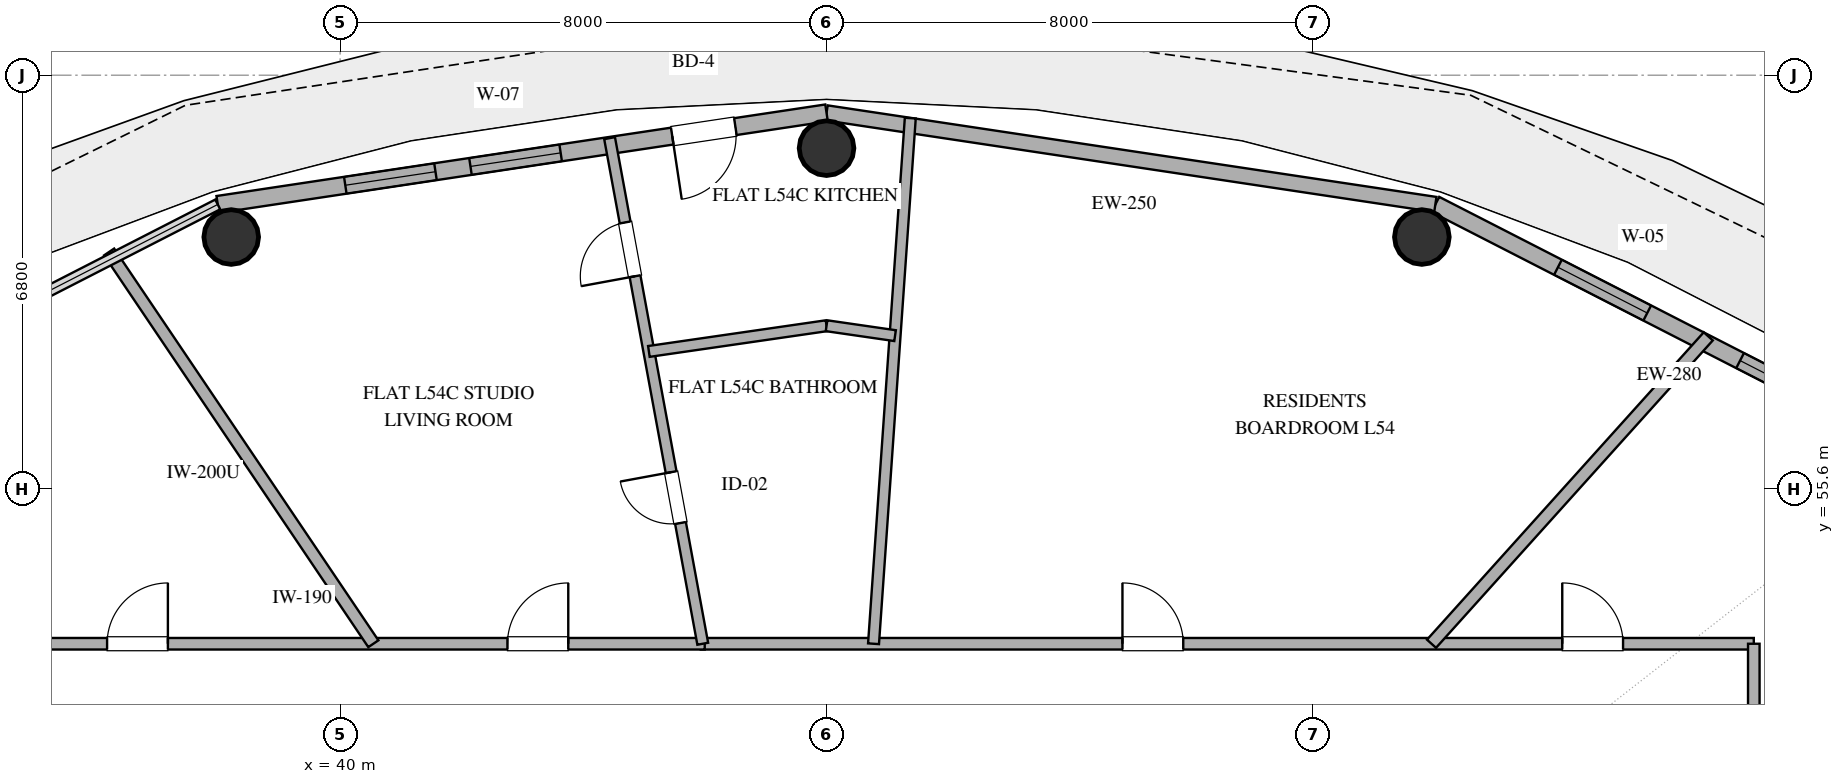
"""IFC4 building model, lengths in metres.
Left out: names, types, materials, properties, quantities, classifications, styles, units other than length and angle.
Written with IfcOpenShell. Run it as: python <this file> out.ifc"""

import sys

from ifc_helpers import new_model, si_unit, direction, frame, frame_2d, origin, origin_2d, place, context, subcontext, project, spatial, rectangle, hollow_circle, extrude, element, fill, save


model = new_model("IFC4")
c1 = context("Model", 3, precision=1e-05, world=origin(), true_north=direction((0.0, 1.0)))
c2 = subcontext(c1, "Body", "Model", "MODEL_VIEW")
j1 = project(units=[si_unit("LENGTHUNIT", "METRE"), si_unit("PLANEANGLEUNIT", "RADIAN")], contexts=[c1])
p1 = place(None, origin())
s1 = spatial("IfcSite", under=j1, at=p1, CompositionType="ELEMENT")
p2 = place(p1, origin())
s2 = spatial("IfcBuilding", under=s1, at=p2, CompositionType="ELEMENT")
p3 = place(p2, frame((0.0, 0.0, 213.6)))
s3 = spatial("IfcBuildingStorey", under=s2, at=p3, CompositionType="ELEMENT", Elevation=213.6)
for number, where, z_axis, x_axis in (
    (1, (57.791, 59.739, 0.0), (0.0, 0.0, 1.0), (1.0, 0.0, 0.0)),
    (2, (48.0, 61.2, 0.0), (0.0, 0.0, 1.0), (1.0, 0.0, 0.0)),
    (3, (38.209, 59.739, 0.0), (0.0, 0.0, 1.0), (1.0, 0.0, 0.0)),
):
    element("IfcColumn", number, at=place(p3, frame(where, z_axis=z_axis, x_axis=x_axis)), inside=s3, PredefinedType="COLUMN", context=c2, shape_type="SweptSolid", body=[
        extrude(hollow_circle(Radius=0.45, WallThickness=0.025, at=origin_2d()), origin(), (0.0, 0.0, 1.0), 3.36),
    ])
p4 = place(p3, frame((66.383, 55.987, 0.0), z_axis=(0.0, 0.0, 1.0), x_axis=(-0.890007394051, 0.455946091699, 0.0)))
e4 = element("IfcWall", 4, at=p4, inside=s3, PredefinedType="SOLIDWALL", context=c2, shape_type="SweptSolid", body=[
    extrude(rectangle(XDim=9.404, YDim=0.28, at=frame_2d((4.702, 0.0))), origin(), (0.0, 0.0, 1.0), 3.36),
])
p5 = place(p4, frame((1.973, 0.0, 0.85)))
e5 = element("IfcOpeningElement", 5, at=p5, cuts=e4, PredefinedType="OPENING", context=c2, shape_type="SweptSolid", body=[
    extrude(rectangle(XDim=1.8, YDim=2.2, at=frame_2d((0.9, 1.1))), frame((0.0, 0.15, 0.0), z_axis=(0.0, -1.0, 0.0), x_axis=(1.0, 0.0, 0.0)), (0.0, 0.0, 1.0), 0.3),
])
p6 = place(p4, frame((5.489, 0.0, 0.85)))
e6 = element("IfcOpeningElement", 6, at=p6, cuts=e4, PredefinedType="OPENING", context=c2, shape_type="SweptSolid", body=[
    extrude(rectangle(XDim=1.65, YDim=2.0, at=frame_2d((0.825, 1.0))), frame((0.0, 0.15, 0.0), z_axis=(0.0, -1.0, 0.0), x_axis=(1.0, 0.0, 0.0)), (0.0, 0.0, 1.0), 0.3),
])
p7 = place(p3, frame((58.013, 60.274, 0.0), z_axis=(0.0, 0.0, 1.0), x_axis=(-0.988882522213, 0.148698881169, 0.0)))
e7 = element("IfcWall", 7, at=p7, inside=s3, PredefinedType="SOLIDWALL", context=c2, shape_type="SweptSolid", body=[
    extrude(rectangle(XDim=10.125, YDim=0.25, at=frame_2d((5.062, 0.0))), origin(), (0.0, 0.0, 1.0), 3.36),
])
p8 = place(p3, frame((48.0, 61.78, 0.0), z_axis=(0.0, 0.0, 1.0), x_axis=(-0.988882522213, -0.148698881169, 0.0)))
e8 = element("IfcWall", 8, at=p8, inside=s3, PredefinedType="SOLIDWALL", context=c2, shape_type="SweptSolid", body=[
    extrude(rectangle(XDim=10.125, YDim=0.28, at=frame_2d((5.062, 0.0))), origin(), (0.0, 0.0, 1.0), 3.36),
])
p9 = place(p8, frame((1.516, 0.0, 0.0)))
e9 = element("IfcOpeningElement", 9, at=p9, cuts=e8, PredefinedType="OPENING", context=c2, shape_type="SweptSolid", body=[
    extrude(rectangle(XDim=1.05, YDim=2.2, at=frame_2d((0.525, 1.1))), frame((0.0, 0.15, 0.0), z_axis=(0.0, -1.0, 0.0), x_axis=(1.0, 0.0, 0.0)), (0.0, 0.0, 1.0), 0.3),
])
p10 = place(p8, frame((4.422, 0.0, 0.85)))
e10 = element("IfcOpeningElement", 10, at=p10, cuts=e8, PredefinedType="OPENING", context=c2, shape_type="SweptSolid", body=[
    extrude(rectangle(XDim=1.5, YDim=1.8, at=frame_2d((0.75, 0.9))), frame((0.0, 0.15, 0.0), z_axis=(0.0, -1.0, 0.0), x_axis=(1.0, 0.0, 0.0)), (0.0, 0.0, 1.0), 0.3),
])
p11 = place(p8, frame((6.504, 0.0, 0.85)))
e11 = element("IfcOpeningElement", 11, at=p11, cuts=e8, PredefinedType="OPENING", context=c2, shape_type="SweptSolid", body=[
    extrude(rectangle(XDim=1.5, YDim=1.8, at=frame_2d((0.75, 0.9))), frame((0.0, 0.15, 0.0), z_axis=(0.0, -1.0, 0.0), x_axis=(1.0, 0.0, 0.0)), (0.0, 0.0, 1.0), 0.3),
])
p12 = place(p3, frame((45.931, 53.05, 0.0), z_axis=(0.0, 0.0, 1.0), x_axis=(1.0, 0.0, 0.0)))
e12 = element("IfcWall", 12, at=p12, inside=s3, PredefinedType="PARTITIONING", context=c2, shape_type="SweptSolid", body=[
    extrude(rectangle(XDim=17.319, YDim=0.19, at=frame_2d((8.659, 0.0))), origin(), (0.0, 0.0, 1.0), 2.72),
])
p13 = place(p12, frame((6.935, 0.0, 0.0)))
e13 = element("IfcOpeningElement", 13, at=p13, cuts=e12, PredefinedType="OPENING", context=c2, shape_type="SweptSolid", body=[
    extrude(rectangle(XDim=1.0, YDim=2.2, at=frame_2d((0.5, 1.1))), frame((0.0, 0.105, 0.0), z_axis=(0.0, -1.0, 0.0), x_axis=(1.0, 0.0, 0.0)), (0.0, 0.0, 1.0), 0.21),
])
p14 = place(p12, frame((14.168, 0.0, 0.0)))
e14 = element("IfcOpeningElement", 14, at=p14, cuts=e12, PredefinedType="OPENING", context=c2, shape_type="SweptSolid", body=[
    extrude(rectangle(XDim=1.0, YDim=2.2, at=frame_2d((0.5, 1.1))), frame((0.0, 0.105, 0.0), z_axis=(0.0, -1.0, 0.0), x_axis=(1.0, 0.0, 0.0)), (0.0, 0.0, 1.0), 0.21),
])
p15 = place(p3, frame((32.75, 53.05, 0.0), z_axis=(0.0, 0.0, 1.0), x_axis=(1.0, 0.0, 0.0)))
e15 = element("IfcWall", 15, at=p15, inside=s3, PredefinedType="PARTITIONING", context=c2, shape_type="SweptSolid", body=[
    extrude(rectangle(XDim=13.247, YDim=0.19, at=frame_2d((6.623, 0.0))), origin(), (0.0, 0.0, 1.0), 2.72),
])
p16 = place(p15, frame((3.417, 0.0, 0.0)))
e16 = element("IfcOpeningElement", 16, at=p16, cuts=e15, PredefinedType="OPENING", context=c2, shape_type="SweptSolid", body=[
    extrude(rectangle(XDim=1.0, YDim=2.2, at=frame_2d((0.5, 1.1))), frame((0.0, 0.105, 0.0), z_axis=(0.0, -1.0, 0.0), x_axis=(1.0, 0.0, 0.0)), (0.0, 0.0, 1.0), 0.21),
])
p17 = place(p15, frame((10.002, 0.0, 0.0)))
e17 = element("IfcOpeningElement", 17, at=p17, cuts=e15, PredefinedType="OPENING", context=c2, shape_type="SweptSolid", body=[
    extrude(rectangle(XDim=1.0, YDim=2.2, at=frame_2d((0.5, 1.1))), frame((0.0, 0.105, 0.0), z_axis=(0.0, -1.0, 0.0), x_axis=(1.0, 0.0, 0.0)), (0.0, 0.0, 1.0), 0.21),
])
p18 = place(p3, frame((40.547, 53.05, 0.0), z_axis=(0.0, 0.0, 1.0), x_axis=(-0.559208454265, 0.8290270832, 0.0)))
e18 = element("IfcWall", 18, at=p18, inside=s3, PredefinedType="PARTITIONING", context=c2, shape_type="SweptSolid", body=[
    extrude(rectangle(XDim=7.771, YDim=0.2, at=frame_2d((3.886, 0.0))), origin(), (0.0, 0.0, 1.0), 2.72),
])
p19 = place(p3, frame((57.949, 53.05, 0.0), z_axis=(0.0, 0.0, 1.0), x_axis=(0.66913524162, 0.743140651844, 0.0)))
e19 = element("IfcWall", 19, at=p19, inside=s3, PredefinedType="PARTITIONING", context=c2, shape_type="SweptSolid", body=[
    extrude(rectangle(XDim=6.802, YDim=0.2, at=frame_2d((3.401, 0.0))), origin(), (0.0, 0.0, 1.0), 2.72),
])
p20 = place(p3, frame((48.773, 53.05, 0.0), z_axis=(0.0, 0.0, 1.0), x_axis=(0.069763237321, 0.997563577281, 0.0)))
e20 = element("IfcWall", 20, at=p20, inside=s3, PredefinedType="PLUMBINGWALL", context=c2, shape_type="SweptSolid", body=[
    extrude(rectangle(XDim=8.665, YDim=0.18, at=frame_2d((4.333, 0.0))), origin(), (0.0, 0.0, 1.0), 2.72),
])
p21 = place(p3, frame((45.964, 53.05, 0.0), z_axis=(0.0, 0.0, 1.0), x_axis=(-0.181227840828, 0.983441136881, 0.0)))
e21 = element("IfcWall", 21, at=p21, inside=s3, PredefinedType="PLUMBINGWALL", context=c2, shape_type="SweptSolid", body=[
    extrude(rectangle(XDim=8.455, YDim=0.18, at=frame_2d((4.227, 0.0))), origin(), (0.0, 0.0, 1.0), 2.72),
])
p22 = place(p21, frame((2.019, 0.0, 0.0)))
e22 = element("IfcOpeningElement", 22, at=p22, cuts=e21, PredefinedType="OPENING", context=c2, shape_type="SweptSolid", body=[
    extrude(rectangle(XDim=0.85, YDim=2.1, at=frame_2d((0.425, 1.05))), frame((0.0, 0.1, 0.0), z_axis=(0.0, -1.0, 0.0), x_axis=(1.0, 0.0, 0.0)), (0.0, 0.0, 1.0), 0.2),
])
p23 = place(p21, frame((6.145, 0.0, 0.0)))
e23 = element("IfcOpeningElement", 23, at=p23, cuts=e21, PredefinedType="OPENING", context=c2, shape_type="SweptSolid", body=[
    extrude(rectangle(XDim=0.9, YDim=2.1, at=frame_2d((0.45, 1.05))), frame((0.0, 0.1, 0.0), z_axis=(0.0, -1.0, 0.0), x_axis=(1.0, 0.0, 0.0)), (0.0, 0.0, 1.0), 0.2),
])
p24 = place(p3, frame((63.25, 45.35, 0.0), z_axis=(0.0, 0.0, 1.0), x_axis=(0.0, 1.0, 0.0)))
e24 = element("IfcWall", 24, at=p24, inside=s3, PredefinedType="PARTITIONING", context=c2, shape_type="SweptSolid", body=[
    extrude(rectangle(XDim=7.7, YDim=0.19, at=frame_2d((3.85, 0.0))), origin(), (0.0, 0.0, 1.0), 2.72),
])
p25 = place(p3, frame((45.078, 57.857, 0.0), z_axis=(0.0, 0.0, 1.0), x_axis=(0.989678113628, 0.143308169361, 0.0)))
e25 = element("IfcWall", 25, at=p25, inside=s3, PredefinedType="PLUMBINGWALL", context=c2, shape_type="SweptSolid", body=[
    extrude(rectangle(XDim=2.952, YDim=0.18, at=frame_2d((1.476, 0.0))), origin(), (0.0, 0.0, 1.0), 2.72),
])
p26 = place(p3, frame((48.0, 58.28, 0.0), z_axis=(0.0, 0.0, 1.0), x_axis=(0.989660157939, -0.143432115611, 0.0)))
e26 = element("IfcWall", 26, at=p26, inside=s3, PredefinedType="PLUMBINGWALL", context=c2, shape_type="SweptSolid", body=[
    extrude(rectangle(XDim=1.139, YDim=0.18, at=frame_2d((0.569, 0.0))), origin(), (0.0, 0.0, 1.0), 2.72),
])
p27 = place(p5, origin())
e27 = element("IfcWindow", 27, at=p27, inside=s3, PartitioningType="SINGLE_PANEL", PredefinedType="WINDOW", context=c2, shape_type="SweptSolid", body=[
    extrude(rectangle(XDim=1.8, YDim=2.2, at=frame_2d((0.9, 1.1))), frame((0.0, 0.03, 0.0), z_axis=(0.0, -1.0, 0.0), x_axis=(1.0, 0.0, 0.0)), (0.0, 0.0, 1.0), 0.06),
])
fill(e5, e27)
p28 = place(p6, origin())
e28 = element("IfcWindow", 28, at=p28, inside=s3, PartitioningType="SINGLE_PANEL", PredefinedType="WINDOW", context=c2, shape_type="SweptSolid", body=[
    extrude(rectangle(XDim=1.65, YDim=2.0, at=frame_2d((0.825, 1.0))), frame((0.0, 0.03, 0.0), z_axis=(0.0, -1.0, 0.0), x_axis=(1.0, 0.0, 0.0)), (0.0, 0.0, 1.0), 0.06),
])
fill(e6, e28)
p29 = place(p9, origin())
e29 = element("IfcDoor", 29, at=p29, inside=s3, OperationType="SINGLE_SWING_RIGHT", PredefinedType="DOOR", context=c2, shape_type="SweptSolid", body=[
    extrude(rectangle(XDim=1.05, YDim=2.2, at=frame_2d((0.525, 1.1))), frame((0.0, 0.025, 0.0), z_axis=(0.0, -1.0, 0.0), x_axis=(1.0, 0.0, 0.0)), (0.0, 0.0, 1.0), 0.05),
])
fill(e9, e29)
p30 = place(p10, origin())
e30 = element("IfcWindow", 30, at=p30, inside=s3, PartitioningType="SINGLE_PANEL", PredefinedType="WINDOW", context=c2, shape_type="SweptSolid", body=[
    extrude(rectangle(XDim=1.5, YDim=1.8, at=frame_2d((0.75, 0.9))), frame((0.0, 0.03, 0.0), z_axis=(0.0, -1.0, 0.0), x_axis=(1.0, 0.0, 0.0)), (0.0, 0.0, 1.0), 0.06),
])
fill(e10, e30)
p31 = place(p11, origin())
e31 = element("IfcWindow", 31, at=p31, inside=s3, PartitioningType="SINGLE_PANEL", PredefinedType="WINDOW", context=c2, shape_type="SweptSolid", body=[
    extrude(rectangle(XDim=1.5, YDim=1.8, at=frame_2d((0.75, 0.9))), frame((0.0, 0.03, 0.0), z_axis=(0.0, -1.0, 0.0), x_axis=(1.0, 0.0, 0.0)), (0.0, 0.0, 1.0), 0.06),
])
fill(e11, e31)
p32 = place(p13, origin())
e32 = element("IfcDoor", 32, at=p32, inside=s3, OperationType="SINGLE_SWING_LEFT", PredefinedType="DOOR", context=c2, shape_type="SweptSolid", body=[
    extrude(rectangle(XDim=1.0, YDim=2.2, at=frame_2d((0.5, 1.1))), frame((0.0, 0.025, 0.0), z_axis=(0.0, -1.0, 0.0), x_axis=(1.0, 0.0, 0.0)), (0.0, 0.0, 1.0), 0.05),
])
fill(e13, e32)
p33 = place(p14, origin())
e33 = element("IfcDoor", 33, at=p33, inside=s3, OperationType="SINGLE_SWING_LEFT", PredefinedType="DOOR", context=c2, shape_type="SweptSolid", body=[
    extrude(rectangle(XDim=1.0, YDim=2.2, at=frame_2d((0.5, 1.1))), frame((0.0, 0.025, 0.0), z_axis=(0.0, -1.0, 0.0), x_axis=(1.0, 0.0, 0.0)), (0.0, 0.0, 1.0), 0.05),
])
fill(e14, e33)
p34 = place(p16, origin())
e34 = element("IfcDoor", 34, at=p34, inside=s3, OperationType="SINGLE_SWING_RIGHT", PredefinedType="DOOR", context=c2, shape_type="SweptSolid", body=[
    extrude(rectangle(XDim=1.0, YDim=2.2, at=frame_2d((0.5, 1.1))), frame((0.0, 0.025, 0.0), z_axis=(0.0, -1.0, 0.0), x_axis=(1.0, 0.0, 0.0)), (0.0, 0.0, 1.0), 0.05),
])
fill(e16, e34)
p35 = place(p17, origin())
e35 = element("IfcDoor", 35, at=p35, inside=s3, OperationType="SINGLE_SWING_RIGHT", PredefinedType="DOOR", context=c2, shape_type="SweptSolid", body=[
    extrude(rectangle(XDim=1.0, YDim=2.2, at=frame_2d((0.5, 1.1))), frame((0.0, 0.025, 0.0), z_axis=(0.0, -1.0, 0.0), x_axis=(1.0, 0.0, 0.0)), (0.0, 0.0, 1.0), 0.05),
])
fill(e17, e35)
p36 = place(p22, origin())
e36 = element("IfcDoor", 36, at=p36, inside=s3, OperationType="SINGLE_SWING_RIGHT", PredefinedType="DOOR", context=c2, shape_type="SweptSolid", body=[
    extrude(rectangle(XDim=0.85, YDim=2.1, at=frame_2d((0.425, 1.05))), frame((0.0, 0.025, 0.0), z_axis=(0.0, -1.0, 0.0), x_axis=(1.0, 0.0, 0.0)), (0.0, 0.0, 1.0), 0.05),
])
fill(e22, e36)
p37 = place(p23, origin())
e37 = element("IfcDoor", 37, at=p37, inside=s3, OperationType="SINGLE_SWING_LEFT", PredefinedType="DOOR", context=c2, shape_type="SweptSolid", body=[
    extrude(rectangle(XDim=0.9, YDim=2.1, at=frame_2d((0.45, 1.05))), frame((0.0, 0.025, 0.0), z_axis=(0.0, -1.0, 0.0), x_axis=(1.0, 0.0, 0.0)), (0.0, 0.0, 1.0), 0.05),
])
fill(e23, e37)
save(model, sys.argv[1])
